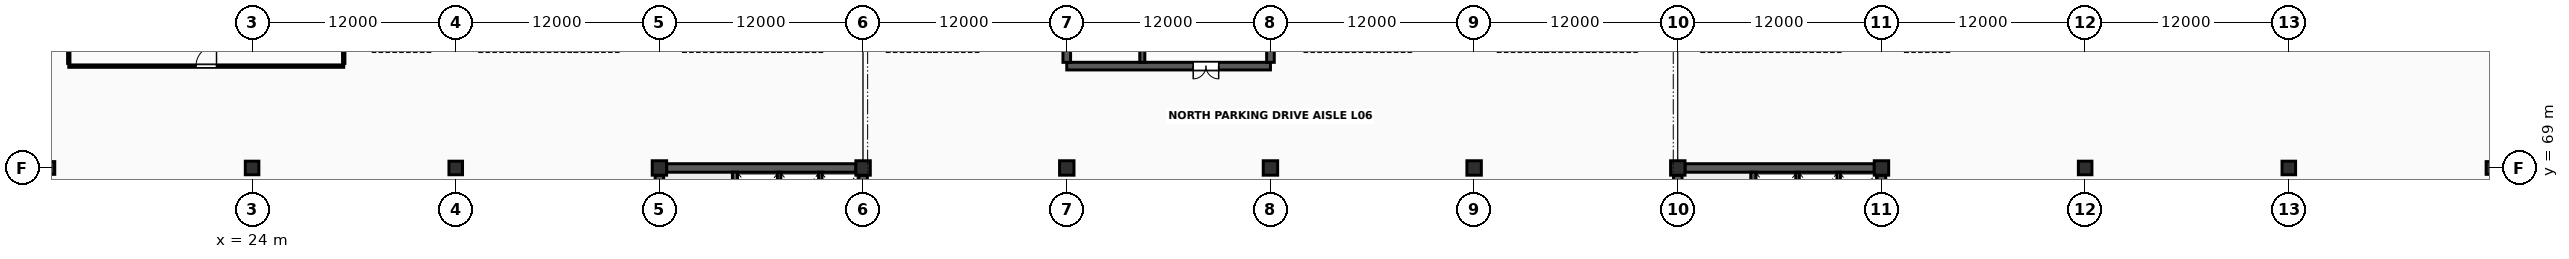
"""IFC4 building model, lengths in metres.
Left out: names, types, materials, properties, quantities, classifications, styles, units other than length and angle.
Written with IfcOpenShell. Run it as: python <this file> out.ifc"""

import sys

from ifc_helpers import new_model, si_unit, direction, frame, frame_2d, origin, origin_2d, place, context, subcontext, project, spatial, rectangle, extrude, element, fill, save


model = new_model("IFC4")
c1 = context("Model", 3, precision=1e-05, world=origin(), true_north=direction((0.0, 1.0)))
c2 = subcontext(c1, "Body", "Model", "MODEL_VIEW")
j1 = project(units=[si_unit("LENGTHUNIT", "METRE"), si_unit("PLANEANGLEUNIT", "RADIAN")], contexts=[c1])
p1 = place(None, origin())
s1 = spatial("IfcSite", under=j1, at=p1, CompositionType="ELEMENT")
p2 = place(p1, origin())
s2 = spatial("IfcBuilding", under=s1, at=p2, CompositionType="ELEMENT")
p3 = place(p2, frame((0.0, 0.0, 24.8)))
s3 = spatial("IfcBuildingStorey", under=s2, at=p3, CompositionType="ELEMENT", Elevation=24.8)
p4 = place(p3, frame((12.0, 69.0, 0.0), z_axis=(0.0, 0.0, 1.0), x_axis=(1.0, 0.0, 0.0)))
e1 = element("IfcColumn", 1, at=p4, inside=s3, PredefinedType="COLUMN", context=c2, shape_type="SweptSolid", body=[
    extrude(rectangle(XDim=0.75, YDim=0.75, at=origin_2d()), origin(), (0.0, 0.0, 1.0), 3.8),
])
for number, where, z_axis, x_axis in (
    (2, (24.0, 69.0, 0.0), (0.0, 0.0, 1.0), (1.0, 0.0, 0.0)),
    (3, (36.0, 69.0, 0.0), (0.0, 0.0, 1.0), (1.0, 0.0, 0.0)),
):
    element("IfcColumn", number, at=place(p3, frame(where, z_axis=z_axis, x_axis=x_axis)), inside=s3, PredefinedType="COLUMN", context=c2, shape_type="SweptSolid", body=[
        extrude(rectangle(XDim=0.8, YDim=0.8, at=origin_2d()), origin(), (0.0, 0.0, 1.0), 3.8),
    ])
for number, where, z_axis, x_axis in (
    (4, (48.0, 69.0, 0.0), (0.0, 0.0, 1.0), (1.0, 0.0, 0.0)),
    (5, (60.0, 69.0, 0.0), (0.0, 0.0, 1.0), (1.0, 0.0, 0.0)),
    (6, (72.0, 69.0, 0.0), (0.0, 0.0, 1.0), (1.0, 0.0, 0.0)),
    (7, (84.0, 69.0, 0.0), (0.0, 0.0, 1.0), (1.0, 0.0, 0.0)),
    (8, (96.0, 69.0, 0.0), (0.0, 0.0, 1.0), (1.0, 0.0, 0.0)),
    (9, (108.0, 69.0, 0.0), (0.0, 0.0, 1.0), (1.0, 0.0, 0.0)),
    (10, (120.0, 69.0, 0.0), (0.0, 0.0, 1.0), (1.0, 0.0, 0.0)),
):
    element("IfcColumn", number, at=place(p3, frame(where, z_axis=z_axis, x_axis=x_axis)), inside=s3, PredefinedType="COLUMN", context=c2, shape_type="SweptSolid", body=[
        extrude(rectangle(XDim=0.85, YDim=0.85, at=origin_2d()), origin(), (0.0, 0.0, 1.0), 3.8),
    ])
for number, where, z_axis, x_axis in (
    (11, (132.0, 69.0, 0.0), (0.0, 0.0, 1.0), (1.0, 0.0, 0.0)),
    (12, (144.0, 69.0, 0.0), (0.0, 0.0, 1.0), (1.0, 0.0, 0.0)),
):
    element("IfcColumn", number, at=place(p3, frame(where, z_axis=z_axis, x_axis=x_axis)), inside=s3, PredefinedType="COLUMN", context=c2, shape_type="SweptSolid", body=[
        extrude(rectangle(XDim=0.8, YDim=0.8, at=origin_2d()), origin(), (0.0, 0.0, 1.0), 3.8),
    ])
p5 = place(p3, frame((156.0, 69.0, 0.0), z_axis=(0.0, 0.0, 1.0), x_axis=(1.0, 0.0, 0.0)))
e13 = element("IfcColumn", 13, at=p5, inside=s3, PredefinedType="COLUMN", context=c2, shape_type="SweptSolid", body=[
    extrude(rectangle(XDim=0.75, YDim=0.75, at=origin_2d()), origin(), (0.0, 0.0, 1.0), 3.8),
])
for number, where, z_axis, x_axis in (
    (14, (48.422, 69.0, 0.0), (0.0, 0.0, 1.0), (1.0, 0.0, 0.0)),
    (15, (48.0, 57.422, 0.0), (0.0, 0.0, 1.0), (0.0, 1.0, 0.0)),
    (16, (60.0, 57.422, 0.0), (0.0, 0.0, 1.0), (0.0, 1.0, 0.0)),
):
    element("IfcWall", number, at=place(p3, frame(where, z_axis=z_axis, x_axis=x_axis)), inside=s3, PredefinedType="SHEAR", context=c2, shape_type="SweptSolid", body=[
        extrude(rectangle(XDim=11.156, YDim=0.5, at=frame_2d((5.578, 0.0))), origin(), (0.0, 0.0, 1.0), 3.628),
    ])
p6 = place(p3, frame((52.45, 57.247, 0.0), z_axis=(0.0, 0.0, 1.0), x_axis=(0.0, 1.0, 0.0)))
e17 = element("IfcWall", 17, at=p6, inside=s3, PredefinedType="SHEAR", context=c2, shape_type="SweptSolid", body=[
    extrude(rectangle(XDim=11.506, YDim=0.3, at=frame_2d((5.753, 0.0))), origin(), (0.0, 0.0, 1.0), 3.628),
])
p7 = place(p6, frame((0.9, 0.0, 0.0)))
e18 = element("IfcOpeningElement", 18, at=p7, cuts=e17, PredefinedType="OPENING", context=c2, shape_type="SweptSolid", body=[
    extrude(rectangle(XDim=1.1, YDim=2.2, at=frame_2d((0.55, 1.1))), frame((0.0, 0.165, 0.0), z_axis=(0.0, -1.0, 0.0), x_axis=(1.0, 0.0, 0.0)), (0.0, 0.0, 1.0), 0.33),
])
for number, where, z_axis, x_axis in (
    (19, (55.05, 65.92, 0.0), (0.0, 0.0, 1.0), (0.0, 1.0, 0.0)),
    (20, (57.48, 65.92, 0.0), (0.0, 0.0, 1.0), (0.0, 1.0, 0.0)),
):
    element("IfcWall", number, at=place(p3, frame(where, z_axis=z_axis, x_axis=x_axis)), inside=s3, PredefinedType="SOLIDWALL", context=c2, shape_type="SweptSolid", body=[
        extrude(rectangle(XDim=2.83, YDim=0.2, at=frame_2d((1.415, 0.0))), origin(), (0.0, 0.0, 1.0), 3.618),
    ])
for number, where, z_axis, x_axis in (
    (21, (108.422, 69.0, 0.0), (0.0, 0.0, 1.0), (1.0, 0.0, 0.0)),
    (22, (108.0, 57.422, 0.0), (0.0, 0.0, 1.0), (0.0, 1.0, 0.0)),
    (23, (120.0, 57.422, 0.0), (0.0, 0.0, 1.0), (0.0, 1.0, 0.0)),
):
    element("IfcWall", number, at=place(p3, frame(where, z_axis=z_axis, x_axis=x_axis)), inside=s3, PredefinedType="SHEAR", context=c2, shape_type="SweptSolid", body=[
        extrude(rectangle(XDim=11.156, YDim=0.5, at=frame_2d((5.578, 0.0))), origin(), (0.0, 0.0, 1.0), 3.628),
    ])
p8 = place(p3, frame((112.45, 57.247, 0.0), z_axis=(0.0, 0.0, 1.0), x_axis=(0.0, 1.0, 0.0)))
e24 = element("IfcWall", 24, at=p8, inside=s3, PredefinedType="SHEAR", context=c2, shape_type="SweptSolid", body=[
    extrude(rectangle(XDim=11.506, YDim=0.3, at=frame_2d((5.753, 0.0))), origin(), (0.0, 0.0, 1.0), 3.628),
])
p9 = place(p8, frame((0.9, 0.0, 0.0)))
e25 = element("IfcOpeningElement", 25, at=p9, cuts=e24, PredefinedType="OPENING", context=c2, shape_type="SweptSolid", body=[
    extrude(rectangle(XDim=1.1, YDim=2.2, at=frame_2d((0.55, 1.1))), frame((0.0, 0.165, 0.0), z_axis=(0.0, -1.0, 0.0), x_axis=(1.0, 0.0, 0.0)), (0.0, 0.0, 1.0), 0.33),
])
for number, where, z_axis, x_axis in (
    (26, (115.05, 65.92, 0.0), (0.0, 0.0, 1.0), (0.0, 1.0, 0.0)),
    (27, (117.48, 65.92, 0.0), (0.0, 0.0, 1.0), (0.0, 1.0, 0.0)),
):
    element("IfcWall", number, at=place(p3, frame(where, z_axis=z_axis, x_axis=x_axis)), inside=s3, PredefinedType="SOLIDWALL", context=c2, shape_type="SweptSolid", body=[
        extrude(rectangle(XDim=2.83, YDim=0.2, at=frame_2d((1.415, 0.0))), origin(), (0.0, 0.0, 1.0), 3.618),
    ])
p10 = place(p3, frame((72.0, 75.0, 0.0), z_axis=(0.0, 0.0, 1.0), x_axis=(1.0, 0.0, 0.0)))
e28 = element("IfcWall", 28, at=p10, inside=s3, PredefinedType="SHEAR", context=c2, shape_type="SweptSolid", body=[
    extrude(rectangle(XDim=12.0, YDim=0.45, at=frame_2d((6.0, 0.0))), origin(), (0.0, 0.0, 1.0), 3.628),
])
p11 = place(p10, frame((7.45, 0.0, 0.0)))
e29 = element("IfcOpeningElement", 29, at=p11, cuts=e28, PredefinedType="OPENING", context=c2, shape_type="SweptSolid", body=[
    extrude(rectangle(XDim=1.5, YDim=2.25, at=frame_2d((0.75, 1.125))), frame((0.0, 0.24, 0.0), z_axis=(0.0, -1.0, 0.0), x_axis=(1.0, 0.0, 0.0)), (0.0, 0.0, 1.0), 0.48),
])
for number, where, z_axis, x_axis in (
    (30, (72.0, 75.222, 0.0), (0.0, 0.0, 1.0), (0.0, 1.0, 0.0)),
    (31, (84.0, 75.222, 0.0), (0.0, 0.0, 1.0), (0.0, 1.0, 0.0)),
):
    element("IfcWall", number, at=place(p3, frame(where, z_axis=z_axis, x_axis=x_axis)), inside=s3, PredefinedType="SHEAR", context=c2, shape_type="SweptSolid", body=[
        extrude(rectangle(XDim=11.381, YDim=0.45, at=frame_2d((5.69, 0.0))), origin(), (0.0, 0.0, 1.0), 3.628),
    ])
p12 = place(p3, frame((76.45, 75.222, 0.0), z_axis=(0.0, 0.0, 1.0), x_axis=(0.0, 1.0, 0.0)))
e32 = element("IfcWall", 32, at=p12, inside=s3, PredefinedType="SHEAR", context=c2, shape_type="SweptSolid", body=[
    extrude(rectangle(XDim=11.556, YDim=0.3, at=frame_2d((5.778, 0.0))), origin(), (0.0, 0.0, 1.0), 3.628),
])
p13 = place(p12, frame((0.9, 0.0, 0.0)))
e33 = element("IfcOpeningElement", 33, at=p13, cuts=e32, PredefinedType="OPENING", context=c2, shape_type="SweptSolid", body=[
    extrude(rectangle(XDim=1.1, YDim=2.2, at=frame_2d((0.55, 1.1))), frame((0.0, 0.165, 0.0), z_axis=(0.0, -1.0, 0.0), x_axis=(1.0, 0.0, 0.0)), (0.0, 0.0, 1.0), 0.33),
])
p14 = place(p3, frame((13.2, 75.0, 0.0), z_axis=(0.0, 0.0, 1.0), x_axis=(1.0, 0.0, 0.0)))
e34 = element("IfcWall", 34, at=p14, inside=s3, PredefinedType="PARTITIONING", context=c2, shape_type="SweptSolid", body=[
    extrude(rectangle(XDim=16.2, YDim=0.14, at=frame_2d((8.1, 0.0))), origin(), (0.0, 0.0, 1.0), 2.75),
])
p15 = place(p14, frame((7.495, 0.0, 0.0)))
e35 = element("IfcOpeningElement", 35, at=p15, cuts=e34, PredefinedType="OPENING", context=c2, shape_type="SweptSolid", body=[
    extrude(rectangle(XDim=1.21, YDim=2.25, at=frame_2d((0.605, 1.125))), frame((0.0, 0.085, 0.0), z_axis=(0.0, -1.0, 0.0), x_axis=(1.0, 0.0, 0.0)), (0.0, 0.0, 1.0), 0.17),
])
for number, where, z_axis, x_axis in (
    (36, (13.2, 75.16, 0.0), (0.0, 0.0, 1.0), (0.0, 1.0, 0.0)),
    (37, (29.4, 75.16, 0.0), (0.0, 0.0, 1.0), (0.0, 1.0, 0.0)),
):
    element("IfcWall", number, at=place(p3, frame(where, z_axis=z_axis, x_axis=x_axis)), inside=s3, PredefinedType="PARTITIONING", context=c2, shape_type="SweptSolid", body=[
        extrude(rectangle(XDim=15.68, YDim=0.14, at=frame_2d((7.84, 0.0))), origin(), (0.0, 0.0, 1.0), 2.75),
    ])
p16 = place(p11, origin())
e38 = element("IfcDoor", 38, at=p16, inside=s3, OperationType="DOUBLE_DOOR_SINGLE_SWING", PredefinedType="DOOR", context=c2, shape_type="SweptSolid", body=[
    extrude(rectangle(XDim=1.5, YDim=2.25, at=frame_2d((0.75, 1.125))), frame((0.0, 0.025, 0.0), z_axis=(0.0, -1.0, 0.0), x_axis=(1.0, 0.0, 0.0)), (0.0, 0.0, 1.0), 0.05),
])
fill(e29, e38)
p17 = place(p15, origin())
e39 = element("IfcDoor", 39, at=p17, inside=s3, OperationType="SINGLE_SWING_RIGHT", PredefinedType="DOOR", context=c2, shape_type="SweptSolid", body=[
    extrude(rectangle(XDim=1.21, YDim=2.25, at=frame_2d((0.605, 1.125))), frame((0.0, 0.025, 0.0), z_axis=(0.0, -1.0, 0.0), x_axis=(1.0, 0.0, 0.0)), (0.0, 0.0, 1.0), 0.05),
])
fill(e35, e39)
save(model, sys.argv[1])
